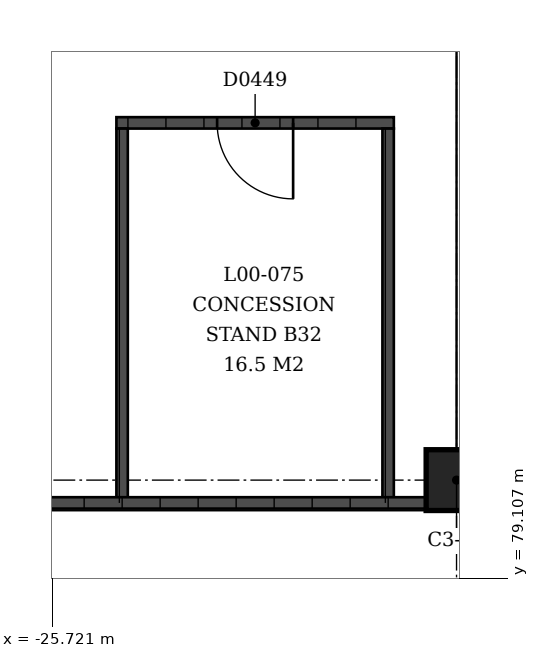
"""IFC4 building model, lengths in metres.
Left out: names, types, materials, properties, quantities, classifications, styles, units other than length and angle.
Written with IfcOpenShell. Run it as: python <this file> out.ifc"""

import sys

from ifc_helpers import new_model, si_unit, direction, frame, frame_2d, origin, origin_2d, place, context, subcontext, project, spatial, rectangle, extrude, element, fill, save


model = new_model("IFC4")
c1 = context("Model", 3, precision=1e-05, world=origin(), true_north=direction((0.0, 1.0)))
c2 = subcontext(c1, "Body", "Model", "MODEL_VIEW")
j1 = project(units=[si_unit("LENGTHUNIT", "METRE"), si_unit("PLANEANGLEUNIT", "RADIAN")], contexts=[c1])
p1 = place(None, origin())
s1 = spatial("IfcSite", under=j1, at=p1, CompositionType="ELEMENT")
p2 = place(p1, origin())
s2 = spatial("IfcBuilding", under=s1, at=p2, CompositionType="ELEMENT")
p3 = place(p2, origin())
s3 = spatial("IfcBuildingStorey", under=s2, at=p3, CompositionType="ELEMENT", Elevation=0.0)
p4 = place(p3, frame((-20.4, 80.4, 0.0), z_axis=(0.0, 0.0, 1.0), x_axis=(-1.0, 0.0, 0.0)))
e1 = element("IfcColumn", 1, at=p4, inside=s3, PredefinedType="COLUMN", context=c2, shape_type="SweptSolid", body=[
    extrude(rectangle(XDim=0.8, YDim=0.8, at=origin_2d()), origin(), (0.0, 0.0, 1.0), 4.5),
])
p5 = place(p3, frame((-24.875, 85.1, 0.0), z_axis=(0.0, 0.0, 1.0), x_axis=(1.0, 0.0, 0.0)))
e2 = element("IfcWall", 2, at=p5, inside=s3, PredefinedType="SOLIDWALL", context=c2, shape_type="SweptSolid", body=[
    extrude(rectangle(XDim=3.65, YDim=0.15, at=frame_2d((1.825, 0.0))), origin(), (0.0, 0.0, 1.0), 3.0),
])
p6 = place(p5, frame((1.325, 0.0, 0.0)))
e3 = element("IfcOpeningElement", 3, at=p6, cuts=e2, PredefinedType="OPENING", context=c2, shape_type="SweptSolid", body=[
    extrude(rectangle(XDim=1.0, YDim=2.1, at=frame_2d((0.5, 1.05))), frame((0.0, 0.075, 0.0), z_axis=(0.0, -1.0, 0.0), x_axis=(1.0, 0.0, 0.0)), (0.0, 0.0, 1.0), 0.15),
])
for number, where, z_axis, x_axis in (
    (4, (-24.8, 80.1, 0.0), (0.0, 0.0, 1.0), (0.0, 1.0, 0.0)),
    (5, (-21.3, 80.1, 0.0), (0.0, 0.0, 1.0), (0.0, 1.0, 0.0)),
):
    element("IfcWall", number, at=place(p3, frame(where, z_axis=z_axis, x_axis=x_axis)), inside=s3, PredefinedType="SOLIDWALL", context=c2, shape_type="SweptSolid", body=[
        extrude(rectangle(XDim=4.925, YDim=0.15, at=frame_2d((2.462, 0.0))), origin(), (0.0, 0.0, 1.0), 3.0),
    ])
p7 = place(p3, frame((-33.5, 80.1, 0.0), z_axis=(0.0, 0.0, 1.0), x_axis=(1.0, 0.0, 0.0)))
e6 = element("IfcWall", 6, at=p7, inside=s3, PredefinedType="SOLIDWALL", context=c2, shape_type="SweptSolid", body=[
    extrude(rectangle(XDim=12.7, YDim=0.15, at=frame_2d((6.35, 0.0))), origin(), (0.0, 0.0, 1.0), 3.0),
])
p8 = place(p6, origin())
e7 = element("IfcDoor", 7, at=p8, inside=s3, OperationType="SINGLE_SWING_RIGHT", PredefinedType="DOOR", context=c2, shape_type="SweptSolid", body=[
    extrude(rectangle(XDim=1.0, YDim=2.1, at=frame_2d((0.5, 1.05))), frame((0.0, 0.025, 0.0), z_axis=(0.0, -1.0, 0.0), x_axis=(1.0, 0.0, 0.0)), (0.0, 0.0, 1.0), 0.05),
])
fill(e3, e7)
save(model, sys.argv[1])
